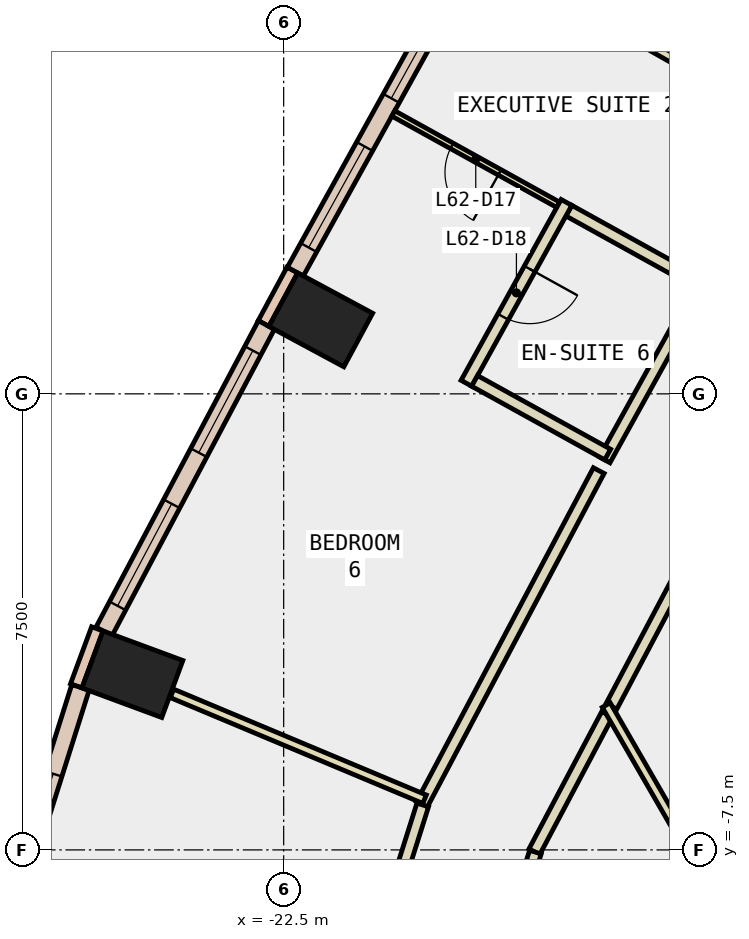
"""IFC4 building model, lengths in metres.
Left out: names, types, materials, properties, quantities, classifications, styles, units other than length and angle.
Written with IfcOpenShell. Run it as: python <this file> out.ifc"""

import sys

from ifc_helpers import new_model, si_unit, direction, frame, frame_2d, origin, origin_2d, place, context, subcontext, project, spatial, rectangle, extrude, element, fill, save


model = new_model("IFC4")
c1 = context("Model", 3, precision=1e-05, world=origin(), true_north=direction((0.0, 1.0)))
c2 = subcontext(c1, "Body", "Model", "MODEL_VIEW")
j1 = project(units=[si_unit("LENGTHUNIT", "METRE"), si_unit("PLANEANGLEUNIT", "RADIAN")], contexts=[c1])
p1 = place(None, origin())
s1 = spatial("IfcSite", under=j1, at=p1, CompositionType="ELEMENT")
p2 = place(p1, origin())
s2 = spatial("IfcBuilding", under=s1, at=p2, CompositionType="ELEMENT")
p3 = place(p2, frame((0.0, 0.0, 270.2)))
s3 = spatial("IfcBuildingStorey", under=s2, at=p3, CompositionType="ELEMENT", Elevation=270.2)
for number, where, z_axis, x_axis in (
    (1, (-21.89, 1.217, -0.34), (0.0, 0.0, 1.0), (0.474, 0.881, 0.0)),
    (2, (-24.988, -4.611, -0.34), (0.0, 0.0, 1.0), (0.347, 0.938, 0.0)),
):
    element("IfcColumn", number, at=place(p3, frame(where, z_axis=z_axis, x_axis=x_axis)), inside=s3, PredefinedType="COLUMN", context=c2, shape_type="SweptSolid", body=[
        extrude(rectangle(XDim=1.0, YDim=1.4, at=origin_2d()), origin(), (0.0, 0.0, 1.0), 3.6),
    ])
p4 = place(p3, frame((-22.357, 2.037, 0.0), z_axis=(0.0, 0.0, 1.0), x_axis=(-0.473852444207, -0.880604259085, 0.0)))
e3 = element("IfcWall", 3, at=p4, inside=s3, PredefinedType="STANDARD", context=c2, shape_type="SweptSolid", body=[
    extrude(rectangle(XDim=1.0, YDim=0.2, at=frame_2d((0.5, 0.0))), origin(), (0.0, 0.0, 1.0), 3.26),
])
p5 = place(p3, frame((-25.565, -3.865, 0.0), z_axis=(0.0, 0.0, 1.0), x_axis=(-0.347107644204, -0.937825294677, 0.0)))
e4 = element("IfcWall", 4, at=p5, inside=s3, PredefinedType="STANDARD", context=c2, shape_type="SweptSolid", body=[
    extrude(rectangle(XDim=1.0, YDim=0.2, at=frame_2d((0.5, 0.0))), origin(), (0.0, 0.0, 1.0), 3.26),
])
p6 = place(p3, frame((-19.591, 6.919, 0.0), z_axis=(0.0, 0.0, 1.0), x_axis=(-0.484260568952, -0.874923826032, 0.0)))
e5 = element("IfcWall", 5, at=p6, inside=s3, PredefinedType="STANDARD", context=c2, shape_type="SweptSolid", body=[
    extrude(rectangle(XDim=5.611, YDim=0.3, at=frame_2d((2.805, 0.0))), origin(), (0.0, 0.0, 1.0), 3.26),
])
p7 = place(p6, frame((0.453, 0.0, 0.9)))
e6 = element("IfcOpeningElement", 6, at=p7, cuts=e5, PredefinedType="OPENING", context=c2, shape_type="SweptSolid", body=[
    extrude(rectangle(XDim=1.9, YDim=2.0, at=frame_2d((0.95, 1.0))), frame((0.0, 0.16, 0.0), z_axis=(0.0, -1.0, 0.0), x_axis=(1.0, 0.0, 0.0)), (0.0, 0.0, 1.0), 0.32),
])
p8 = place(p6, frame((3.258, 0.0, 0.9)))
e7 = element("IfcOpeningElement", 7, at=p8, cuts=e5, PredefinedType="OPENING", context=c2, shape_type="SweptSolid", body=[
    extrude(rectangle(XDim=1.9, YDim=2.0, at=frame_2d((0.95, 1.0))), frame((0.0, 0.16, 0.0), z_axis=(0.0, -1.0, 0.0), x_axis=(1.0, 0.0, 0.0)), (0.0, 0.0, 1.0), 0.32),
])
p9 = place(p3, frame((-22.784, 1.132, 0.0), z_axis=(0.0, 0.0, 1.0), x_axis=(-0.468220106253, -0.883611867338, 0.0)))
e8 = element("IfcWall", 8, at=p9, inside=s3, PredefinedType="STANDARD", context=c2, shape_type="SweptSolid", body=[
    extrude(rectangle(XDim=5.703, YDim=0.3, at=frame_2d((2.852, 0.0))), origin(), (0.0, 0.0, 1.0), 3.26),
])
p10 = place(p9, frame((0.476, 0.0, 0.9)))
e9 = element("IfcOpeningElement", 9, at=p10, cuts=e8, PredefinedType="OPENING", context=c2, shape_type="SweptSolid", body=[
    extrude(rectangle(XDim=1.9, YDim=2.0, at=frame_2d((0.95, 1.0))), frame((0.0, 0.16, 0.0), z_axis=(0.0, -1.0, 0.0), x_axis=(1.0, 0.0, 0.0)), (0.0, 0.0, 1.0), 0.32),
])
p11 = place(p9, frame((3.327, 0.0, 0.9)))
e10 = element("IfcOpeningElement", 10, at=p11, cuts=e8, PredefinedType="OPENING", context=c2, shape_type="SweptSolid", body=[
    extrude(rectangle(XDim=1.9, YDim=2.0, at=frame_2d((0.95, 1.0))), frame((0.0, 0.16, 0.0), z_axis=(0.0, -1.0, 0.0), x_axis=(1.0, 0.0, 0.0)), (0.0, 0.0, 1.0), 0.32),
])
p12 = place(p3, frame((-25.842, -4.827, 0.0), z_axis=(0.0, 0.0, 1.0), x_axis=(-0.30108868778, -0.953596142028, 0.0)))
e11 = element("IfcWall", 11, at=p12, inside=s3, PredefinedType="STANDARD", context=c2, shape_type="SweptSolid", body=[
    extrude(rectangle(XDim=4.38, YDim=0.3, at=frame_2d((2.19, 0.0))), origin(), (0.0, 0.0, 1.0), 3.26),
])
p13 = place(p12, frame((1.49, 0.0, 0.9)))
e12 = element("IfcOpeningElement", 12, at=p13, cuts=e11, PredefinedType="OPENING", context=c2, shape_type="SweptSolid", body=[
    extrude(rectangle(XDim=1.4, YDim=2.0, at=frame_2d((0.7, 1.0))), frame((0.0, 0.16, 0.0), z_axis=(0.0, -1.0, 0.0), x_axis=(1.0, 0.0, 0.0)), (0.0, 0.0, 1.0), 0.32),
])
p14 = place(p3, frame((-15.56, -2.214, 0.0), z_axis=(0.0, 0.0, 1.0), x_axis=(-0.468104679961, -0.883673021314, 0.0)))
e13 = element("IfcWall", 13, at=p14, inside=s3, PredefinedType="PARTITIONING", context=c2, shape_type="SweptSolid", body=[
    extrude(rectangle(XDim=3.309, YDim=0.2, at=frame_2d((1.654, 0.0))), origin(), (0.0, 0.0, 1.0), 3.26),
])
p15 = place(p3, frame((-17.18, -5.271, 0.0), z_axis=(0.0, 0.0, 1.0), x_axis=(-0.468212372113, -0.883615965564, 0.0)))
e14 = element("IfcWall", 14, at=p15, inside=s3, PredefinedType="PARTITIONING", context=c2, shape_type="SweptSolid", body=[
    extrude(rectangle(XDim=2.557, YDim=0.2, at=frame_2d((1.278, 0.0))), origin(), (0.0, 0.0, 1.0), 3.26),
])
p16 = place(p3, frame((-18.36, -7.537, 0.0), z_axis=(0.0, 0.0, 1.0), x_axis=(-0.301325410186, -0.953521366922, 0.0)))
e15 = element("IfcWall", 15, at=p16, inside=s3, PredefinedType="PARTITIONING", context=c2, shape_type="SweptSolid", body=[
    extrude(rectangle(XDim=2.469, YDim=0.2, at=frame_2d((1.234, 0.0))), origin(), (0.0, 0.0, 1.0), 3.26),
])
p17 = place(p3, frame((-20.229, -6.754, 0.0), z_axis=(0.0, 0.0, 1.0), x_axis=(0.468313568794, 0.883562335822, 0.0)))
e16 = element("IfcWall", 16, at=p17, inside=s3, PredefinedType="PARTITIONING", context=c2, shape_type="SweptSolid", body=[
    extrude(rectangle(XDim=6.216, YDim=0.2, at=frame_2d((3.108, 0.0))), origin(), (0.0, 0.0, 1.0), 3.26),
])
p18 = place(p3, frame((-17.221, -1.085, 0.0), z_axis=(0.0, 0.0, 1.0), x_axis=(0.48445041864, 0.874818719438, 0.0)))
e17 = element("IfcWall", 17, at=p18, inside=s3, PredefinedType="PARTITIONING", context=c2, shape_type="SweptSolid", body=[
    extrude(rectangle(XDim=3.2, YDim=0.2, at=frame_2d((1.6, 0.0))), origin(), (0.0, 0.0, 1.0), 3.26),
])
p19 = place(p3, frame((-21.18, -9.821, 0.0), z_axis=(0.0, 0.0, 1.0), x_axis=(0.301331608119, 0.953519408271, 0.0)))
e18 = element("IfcWall", 18, at=p19, inside=s3, PredefinedType="PARTITIONING", context=c2, shape_type="SweptSolid", body=[
    extrude(rectangle(XDim=3.209, YDim=0.2, at=frame_2d((1.604, 0.0))), origin(), (0.0, 0.0, 1.0), 3.26),
])
p20 = place(p3, frame((-15.427, -8.18, 0.0), z_axis=(0.0, 0.0, 1.0), x_axis=(-0.500045204515, 0.865999303373, 0.0)))
e19 = element("IfcWall", 19, at=p20, inside=s3, PredefinedType="PARTITIONING", context=c2, shape_type="SweptSolid", body=[
    extrude(rectangle(XDim=3.536, YDim=0.15, at=frame_2d((1.768, 0.0))), origin(), (0.0, 0.0, 1.0), 3.26),
])
p21 = place(p3, frame((-14.083, 4.377, 0.0), z_axis=(0.0, 0.0, 1.0), x_axis=(-0.870415885751, 0.492317159799, 0.0)))
e20 = element("IfcWall", 20, at=p21, inside=s3, PredefinedType="PARTITIONING", context=c2, shape_type="SweptSolid", body=[
    extrude(rectangle(XDim=4.581, YDim=0.15, at=frame_2d((2.29, 0.0))), origin(), (0.0, 0.0, 1.0), 3.26),
])
p22 = place(p3, frame((-17.985, 3.109, 0.0), z_axis=(0.0, 0.0, 1.0), x_axis=(-0.874762085098, 0.484552674614, 0.0)))
e21 = element("IfcWall", 21, at=p22, inside=s3, PredefinedType="PARTITIONING", context=c2, shape_type="SweptSolid", body=[
    extrude(rectangle(XDim=3.1, YDim=0.1, at=frame_2d((1.55, 0.0))), origin(), (0.0, 0.0, 1.0), 3.26),
])
p23 = place(p22, frame((1.1, 0.0, 0.0)))
e22 = element("IfcOpeningElement", 22, at=p23, cuts=e21, PredefinedType="OPENING", context=c2, shape_type="SweptSolid", body=[
    extrude(rectangle(XDim=0.9, YDim=2.1, at=frame_2d((0.45, 1.05))), frame((0.0, 0.06, 0.0), z_axis=(0.0, -1.0, 0.0), x_axis=(1.0, 0.0, 0.0)), (0.0, 0.0, 1.0), 0.12),
])
p24 = place(p3, frame((-15.71, 1.85, 0.0), z_axis=(0.0, 0.0, 1.0), x_axis=(-0.874842414173, 0.484407628308, 0.0)))
e23 = element("IfcWall", 23, at=p24, inside=s3, PredefinedType="PARTITIONING", context=c2, shape_type="SweptSolid", body=[
    extrude(rectangle(XDim=2.401, YDim=0.2, at=frame_2d((1.2, 0.0))), origin(), (0.0, 0.0, 1.0), 3.26),
])
p25 = place(p3, frame((-17.849, 3.148, 0.0), z_axis=(0.0, 0.0, 1.0), x_axis=(-0.484257957482, -0.874925271446, 0.0)))
e24 = element("IfcWall", 24, at=p25, inside=s3, PredefinedType="PARTITIONING", context=c2, shape_type="SweptSolid", body=[
    extrude(rectangle(XDim=3.399, YDim=0.2, at=frame_2d((1.699, 0.0))), origin(), (0.0, 0.0, 1.0), 3.26),
])
p26 = place(p25, frame((1.25, 0.0, 0.0)))
e25 = element("IfcOpeningElement", 25, at=p26, cuts=e24, PredefinedType="OPENING", context=c2, shape_type="SweptSolid", body=[
    extrude(rectangle(XDim=0.9, YDim=2.1, at=frame_2d((0.45, 1.05))), frame((0.0, 0.11, 0.0), z_axis=(0.0, -1.0, 0.0), x_axis=(1.0, 0.0, 0.0)), (0.0, 0.0, 1.0), 0.22),
])
p27 = place(p3, frame((-19.36, 0.213, 0.0), z_axis=(0.0, 0.0, 1.0), x_axis=(0.874939003568, -0.484233146362, 0.0)))
e26 = element("IfcWall", 26, at=p27, inside=s3, PredefinedType="PARTITIONING", context=c2, shape_type="SweptSolid", body=[
    extrude(rectangle(XDim=2.501, YDim=0.2, at=frame_2d((1.25, 0.0))), origin(), (0.0, 0.0, 1.0), 3.26),
])
p28 = place(p3, frame((-20.183, -6.666, 0.0), z_axis=(0.0, 0.0, 1.0), x_axis=(-0.922347108299, 0.386362280525, 0.0)))
e27 = element("IfcWall", 27, at=p28, inside=s3, PredefinedType="PARTITIONING", context=c2, shape_type="SweptSolid", body=[
    extrude(rectangle(XDim=4.503, YDim=0.15, at=frame_2d((2.252, 0.0))), origin(), (0.0, 0.0, 1.0), 3.26),
])
p29 = place(p7, origin())
e28 = element("IfcWindow", 28, at=p29, inside=s3, PartitioningType="SINGLE_PANEL", PredefinedType="WINDOW", context=c2, shape_type="SweptSolid", body=[
    extrude(rectangle(XDim=1.9, YDim=2.0, at=frame_2d((0.95, 1.0))), frame((0.0, 0.03, 0.0), z_axis=(0.0, -1.0, 0.0), x_axis=(1.0, 0.0, 0.0)), (0.0, 0.0, 1.0), 0.06),
])
fill(e6, e28)
p30 = place(p8, origin())
e29 = element("IfcWindow", 29, at=p30, inside=s3, PartitioningType="SINGLE_PANEL", PredefinedType="WINDOW", context=c2, shape_type="SweptSolid", body=[
    extrude(rectangle(XDim=1.9, YDim=2.0, at=frame_2d((0.95, 1.0))), frame((0.0, 0.03, 0.0), z_axis=(0.0, -1.0, 0.0), x_axis=(1.0, 0.0, 0.0)), (0.0, 0.0, 1.0), 0.06),
])
fill(e7, e29)
p31 = place(p10, origin())
e30 = element("IfcWindow", 30, at=p31, inside=s3, PartitioningType="SINGLE_PANEL", PredefinedType="WINDOW", context=c2, shape_type="SweptSolid", body=[
    extrude(rectangle(XDim=1.9, YDim=2.0, at=frame_2d((0.95, 1.0))), frame((0.0, 0.03, 0.0), z_axis=(0.0, -1.0, 0.0), x_axis=(1.0, 0.0, 0.0)), (0.0, 0.0, 1.0), 0.06),
])
fill(e9, e30)
p32 = place(p11, origin())
e31 = element("IfcWindow", 31, at=p32, inside=s3, PartitioningType="SINGLE_PANEL", PredefinedType="WINDOW", context=c2, shape_type="SweptSolid", body=[
    extrude(rectangle(XDim=1.9, YDim=2.0, at=frame_2d((0.95, 1.0))), frame((0.0, 0.03, 0.0), z_axis=(0.0, -1.0, 0.0), x_axis=(1.0, 0.0, 0.0)), (0.0, 0.0, 1.0), 0.06),
])
fill(e10, e31)
p33 = place(p13, origin())
e32 = element("IfcWindow", 32, at=p33, inside=s3, PartitioningType="SINGLE_PANEL", PredefinedType="WINDOW", context=c2, shape_type="SweptSolid", body=[
    extrude(rectangle(XDim=1.4, YDim=2.0, at=frame_2d((0.7, 1.0))), frame((0.0, 0.03, 0.0), z_axis=(0.0, -1.0, 0.0), x_axis=(1.0, 0.0, 0.0)), (0.0, 0.0, 1.0), 0.06),
])
fill(e12, e32)
p34 = place(p23, origin())
e33 = element("IfcDoor", 33, at=p34, inside=s3, OperationType="SINGLE_SWING_LEFT", PredefinedType="DOOR", context=c2, shape_type="SweptSolid", body=[
    extrude(rectangle(XDim=0.9, YDim=2.1, at=frame_2d((0.45, 1.05))), frame((0.0, 0.025, 0.0), z_axis=(0.0, -1.0, 0.0), x_axis=(1.0, 0.0, 0.0)), (0.0, 0.0, 1.0), 0.05),
])
fill(e22, e33)
p35 = place(p26, origin())
e34 = element("IfcDoor", 34, at=p35, inside=s3, OperationType="SINGLE_SWING_LEFT", PredefinedType="DOOR", context=c2, shape_type="SweptSolid", body=[
    extrude(rectangle(XDim=0.9, YDim=2.1, at=frame_2d((0.45, 1.05))), frame((0.0, 0.025, 0.0), z_axis=(0.0, -1.0, 0.0), x_axis=(1.0, 0.0, 0.0)), (0.0, 0.0, 1.0), 0.05),
])
fill(e25, e34)
save(model, sys.argv[1])
